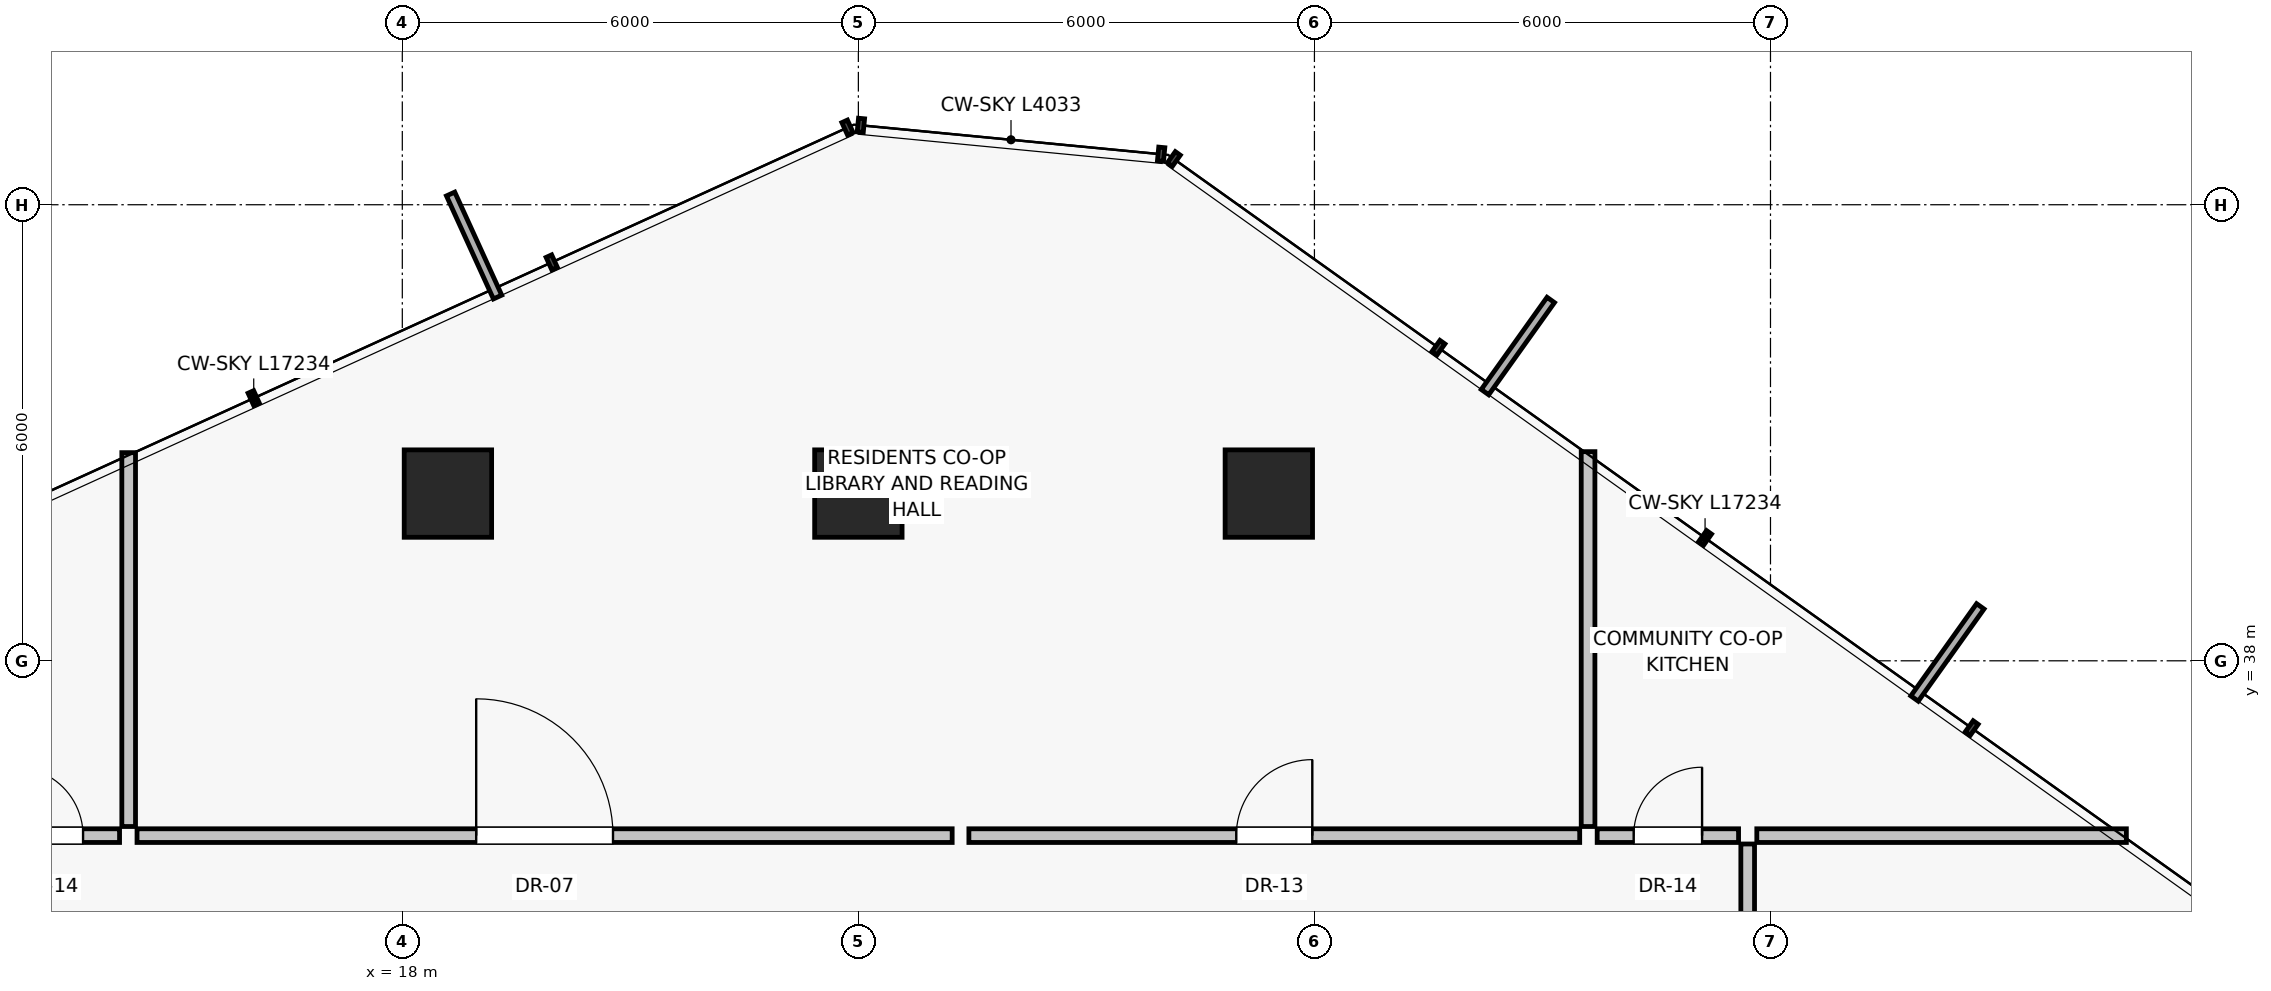
"""IFC4 building model, lengths in metres.
Left out: names, types, materials, properties, quantities, classifications, styles, units other than length and angle.
Written with IfcOpenShell. Run it as: python <this file> out.ifc"""

import sys

from ifc_helpers import new_model, si_unit, direction, frame, frame_2d, origin, origin_2d, place, context, subcontext, project, spatial, rectangle, extrude, source, transform, mapped, element, fill, save


model = new_model("IFC4")
c1 = context("Model", 3, precision=1e-05, world=origin(), true_north=direction((0.0, 1.0)))
c2 = subcontext(c1, "Body", "Model", "MODEL_VIEW")
j1 = project(units=[si_unit("LENGTHUNIT", "METRE"), si_unit("PLANEANGLEUNIT", "RADIAN")], contexts=[c1])
p1 = place(None, origin())
s1 = spatial("IfcSite", under=j1, at=p1, CompositionType="ELEMENT")
p2 = place(p1, origin())
s2 = spatial("IfcBuilding", under=s1, at=p2, CompositionType="ELEMENT")
p3 = place(p2, frame((0.0, 0.0, 108.95)))
s3 = spatial("IfcBuildingStorey", under=s2, at=p3, CompositionType="ELEMENT", Elevation=108.95)
for number, where, z_axis, x_axis in (
    (1, (29.4, 40.2, 0.0), (0.0, 0.0, 1.0), (1.0, 0.0, 0.0)),
    (2, (24.0, 40.2, 0.0), (0.0, 0.0, 1.0), (1.0, 0.0, 0.0)),
    (3, (18.6, 40.2, 0.0), (0.0, 0.0, 1.0), (1.0, 0.0, 0.0)),
):
    element("IfcColumn", number, at=place(p3, frame(where, z_axis=z_axis, x_axis=x_axis)), inside=s3, PredefinedType="COLUMN", context=c2, shape_type="SweptSolid", body=[
        extrude(rectangle(XDim=1.15, YDim=1.15, at=origin_2d()), origin(), (0.0, 0.0, 1.0), 4.3),
    ])
p4 = place(p3, frame((14.4, 35.82, 0.0), z_axis=(0.0, 0.0, 1.0), x_axis=(0.0, 1.0, 0.0)))
e4 = element("IfcWall", 4, at=p4, inside=s3, PredefinedType="PARTITIONING", context=c2, shape_type="SweptSolid", body=[
    extrude(rectangle(XDim=4.918, YDim=0.18, at=frame_2d((2.459, 0.0))), origin(), (0.0, 0.0, 1.0), 4.05),
])
p5 = place(p3, frame((33.6, 35.82, 0.0), z_axis=(0.0, 0.0, 1.0), x_axis=(0.0, 1.0, 0.0)))
e5 = element("IfcWall", 5, at=p5, inside=s3, PredefinedType="PARTITIONING", context=c2, shape_type="SweptSolid", body=[
    extrude(rectangle(XDim=4.932, YDim=0.18, at=frame_2d((2.466, 0.0))), origin(), (0.0, 0.0, 1.0), 4.05),
])
p6 = place(p3, frame((14.51, 35.7, 0.0), z_axis=(0.0, 0.0, 1.0), x_axis=(1.0, 0.0, 0.0)))
e6 = element("IfcWall", 6, at=p6, inside=s3, PredefinedType="PARTITIONING", context=c2, shape_type="SweptSolid", body=[
    extrude(rectangle(XDim=10.724, YDim=0.18, at=frame_2d((5.362, 0.0))), origin(), (0.0, 0.0, 1.0), 3.63),
])
p7 = place(p6, frame((4.462, 0.0, 0.0)))
e7 = element("IfcOpeningElement", 7, at=p7, cuts=e6, PredefinedType="OPENING", context=c2, shape_type="SweptSolid", body=[
    extrude(rectangle(XDim=1.8, YDim=2.25, at=frame_2d((0.9, 1.125))), frame((0.0, 0.1, 0.0), z_axis=(0.0, -1.0, 0.0), x_axis=(1.0, 0.0, 0.0)), (0.0, 0.0, 1.0), 0.2),
])
p8 = place(p3, frame((25.454, 35.7, 0.0), z_axis=(0.0, 0.0, 1.0), x_axis=(1.0, 0.0, 0.0)))
e8 = element("IfcWall", 8, at=p8, inside=s3, PredefinedType="PARTITIONING", context=c2, shape_type="SweptSolid", body=[
    extrude(rectangle(XDim=8.036, YDim=0.18, at=frame_2d((4.018, 0.0))), origin(), (0.0, 0.0, 1.0), 3.63),
])
p9 = place(p8, frame((3.518, 0.0, 0.0)))
e9 = element("IfcOpeningElement", 9, at=p9, cuts=e8, PredefinedType="OPENING", context=c2, shape_type="SweptSolid", body=[
    extrude(rectangle(XDim=1.0, YDim=2.01, at=frame_2d((0.5, 1.005))), frame((0.0, 0.1, 0.0), z_axis=(0.0, -1.0, 0.0), x_axis=(1.0, 0.0, 0.0)), (0.0, 0.0, 1.0), 0.2),
])
p10 = place(p3, frame((35.82, 35.7, 0.0), z_axis=(0.0, 0.0, 1.0), x_axis=(1.0, 0.0, 0.0)))
e10 = element("IfcWall", 10, at=p10, inside=s3, PredefinedType="PARTITIONING", context=c2, shape_type="SweptSolid", body=[
    extrude(rectangle(XDim=4.862, YDim=0.18, at=frame_2d((2.431, 0.0))), origin(), (0.0, 0.0, 1.0), 4.05),
])
p11 = place(p3, frame((35.7, 24.11, 0.0), z_axis=(0.0, 0.0, 1.0), x_axis=(0.0, 1.0, 0.0)))
e11 = element("IfcWall", 11, at=p11, inside=s3, PredefinedType="PARTITIONING", context=c2, shape_type="SweptSolid", body=[
    extrude(rectangle(XDim=11.48, YDim=0.18, at=frame_2d((5.74, 0.0))), origin(), (0.0, 0.0, 1.0), 3.63),
])
p12 = place(p11, frame((5.24, 0.0, 0.0)))
e12 = element("IfcOpeningElement", 12, at=p12, cuts=e11, PredefinedType="OPENING", context=c2, shape_type="SweptSolid", body=[
    extrude(rectangle(XDim=1.0, YDim=2.01, at=frame_2d((0.5, 1.005))), frame((0.0, 0.1, 0.0), z_axis=(0.0, -1.0, 0.0), x_axis=(1.0, 0.0, 0.0)), (0.0, 0.0, 1.0), 0.2),
])
p13 = place(p3, frame((12.42, 35.7, 0.0), z_axis=(0.0, 0.0, 1.0), x_axis=(1.0, 0.0, 0.0)))
e13 = element("IfcWall", 13, at=p13, inside=s3, PredefinedType="PARTITIONING", context=c2, shape_type="SweptSolid", body=[
    extrude(rectangle(XDim=1.86, YDim=0.18, at=frame_2d((0.93, 0.0))), origin(), (0.0, 0.0, 1.0), 4.05),
])
p14 = place(p13, frame((0.48, 0.0, 0.0)))
e14 = element("IfcOpeningElement", 14, at=p14, cuts=e13, PredefinedType="OPENING", context=c2, shape_type="SweptSolid", body=[
    extrude(rectangle(XDim=0.9, YDim=2.01, at=frame_2d((0.45, 1.005))), frame((0.0, 0.1, 0.0), z_axis=(0.0, -1.0, 0.0), x_axis=(1.0, 0.0, 0.0)), (0.0, 0.0, 1.0), 0.2),
])
p15 = place(p3, frame((33.72, 35.7, 0.0), z_axis=(0.0, 0.0, 1.0), x_axis=(1.0, 0.0, 0.0)))
e15 = element("IfcWall", 15, at=p15, inside=s3, PredefinedType="PARTITIONING", context=c2, shape_type="SweptSolid", body=[
    extrude(rectangle(XDim=1.86, YDim=0.18, at=frame_2d((0.93, 0.0))), origin(), (0.0, 0.0, 1.0), 4.05),
])
p16 = place(p15, frame((0.48, 0.0, 0.0)))
e16 = element("IfcOpeningElement", 16, at=p16, cuts=e15, PredefinedType="OPENING", context=c2, shape_type="SweptSolid", body=[
    extrude(rectangle(XDim=0.9, YDim=2.01, at=frame_2d((0.45, 1.005))), frame((0.0, 0.1, 0.0), z_axis=(0.0, -1.0, 0.0), x_axis=(1.0, 0.0, 0.0)), (0.0, 0.0, 1.0), 0.2),
])
m1 = source(origin(), c2, "Body", "SweptSolid", [
    extrude(rectangle(XDim=1.8, YDim=2.25, at=frame_2d((0.9, 1.125))), frame((0.0, 0.025, 0.0), z_axis=(0.0, -1.0, 0.0), x_axis=(1.0, 0.0, 0.0)), (0.0, 0.0, 1.0), 0.05),
])
p17 = place(p7, origin())
e17 = element("IfcDoor", 17, at=p17, inside=s3, OperationType="SINGLE_SWING_LEFT", PredefinedType="DOOR", context=c2, shape_type="MappedRepresentation", body=[
    mapped(m1, transform((0.0, 0.0, 0.0), scale=1.0)),
])
fill(e7, e17)
m2 = source(origin(), c2, "Body", "SweptSolid", [
    extrude(rectangle(XDim=1.0, YDim=2.01, at=frame_2d((0.5, 1.005))), frame((0.0, 0.025, 0.0), z_axis=(0.0, -1.0, 0.0), x_axis=(1.0, 0.0, 0.0)), (0.0, 0.0, 1.0), 0.05),
])
p18 = place(p9, origin())
e18 = element("IfcDoor", 18, at=p18, inside=s3, OperationType="SINGLE_SWING_RIGHT", PredefinedType="DOOR", context=c2, shape_type="MappedRepresentation", body=[
    mapped(m2, transform((0.0, 0.0, 0.0), scale=1.0)),
])
fill(e9, e18)
m3 = source(origin(), c2, "Body", "SweptSolid", [
    extrude(rectangle(XDim=0.9, YDim=2.01, at=frame_2d((0.45, 1.005))), frame((0.0, 0.025, 0.0), z_axis=(0.0, -1.0, 0.0), x_axis=(1.0, 0.0, 0.0)), (0.0, 0.0, 1.0), 0.05),
])
p19 = place(p14, origin())
e19 = element("IfcDoor", 19, at=p19, inside=s3, OperationType="SINGLE_SWING_LEFT", PredefinedType="DOOR", context=c2, shape_type="MappedRepresentation", body=[
    mapped(m3, transform((0.0, 0.0, 0.0), scale=1.0)),
])
fill(e14, e19)
p20 = place(p16, origin())
e20 = element("IfcDoor", 20, at=p20, inside=s3, OperationType="SINGLE_SWING_RIGHT", PredefinedType="DOOR", context=c2, shape_type="MappedRepresentation", body=[
    mapped(m3, transform((0.0, 0.0, 0.0), scale=1.0)),
])
fill(e16, e20)
save(model, sys.argv[1])
